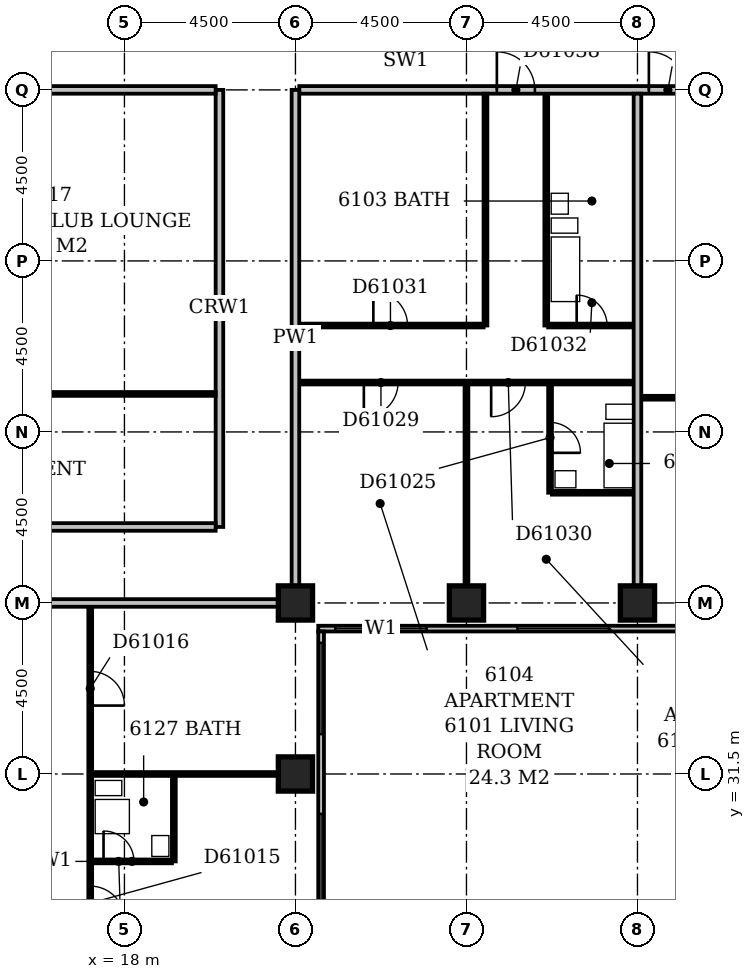
"""IFC4 building model, lengths in metres.
Left out: names, types, materials, properties, quantities, classifications, styles, units other than length and angle.
Written with IfcOpenShell. Run it as: python <this file> out.ifc"""

import sys

from ifc_helpers import new_model, si_unit, direction, frame, frame_2d, origin, origin_2d, place, context, subcontext, project, spatial, rectangle, extrude, element, fill, save


model = new_model("IFC4")
c1 = context("Model", 3, precision=1e-05, world=origin(), true_north=direction((0.0, 1.0)))
c2 = subcontext(c1, "Body", "Model", "MODEL_VIEW")
j1 = project(units=[si_unit("LENGTHUNIT", "METRE"), si_unit("PLANEANGLEUNIT", "RADIAN")], contexts=[c1])
p1 = place(None, origin())
s1 = spatial("IfcSite", under=j1, at=p1, CompositionType="ELEMENT")
p2 = place(p1, origin())
s2 = spatial("IfcBuilding", under=s1, at=p2, CompositionType="ELEMENT")
p3 = place(p2, frame((0.0, 0.0, 236.6)))
s3 = spatial("IfcBuildingStorey", under=s2, at=p3, CompositionType="ELEMENT", Elevation=236.6)
for number, where, z_axis, x_axis in (
    (1, (22.5, 31.5, -0.3), (0.0, 0.0, 1.0), (1.0, 0.0, 0.0)),
    (2, (22.5, 36.0, -0.3), (0.0, 0.0, 1.0), (1.0, 0.0, 0.0)),
    (3, (27.0, 36.0, -0.3), (0.0, 0.0, 1.0), (1.0, 0.0, 0.0)),
    (4, (31.5, 36.0, -0.3), (0.0, 0.0, 1.0), (1.0, 0.0, 0.0)),
):
    element("IfcColumn", number, at=place(p3, frame(where, z_axis=z_axis, x_axis=x_axis)), inside=s3, PredefinedType="COLUMN", context=c2, shape_type="SweptSolid", body=[
        extrude(rectangle(XDim=0.9, YDim=0.9, at=origin_2d()), origin(), (0.0, 0.0, 1.0), 3.6),
    ])
p4 = place(p3, frame((23.175, 17.4, 0.0), z_axis=(0.0, 0.0, 1.0), x_axis=(0.0, 1.0, 0.0)))
e5 = element("IfcWall", 5, at=p4, inside=s3, PredefinedType="STANDARD", context=c2, shape_type="SweptSolid", body=[
    extrude(rectangle(XDim=17.85, YDim=0.15, at=frame_2d((8.925, 0.0))), origin(), (0.0, 0.0, 1.0), 2.7),
])
p5 = place(p4, frame((1.357, 0.0, 0.6)))
e6 = element("IfcOpeningElement", 6, at=p5, cuts=e5, PredefinedType="OPENING", context=c2, shape_type="SweptSolid", body=[
    extrude(rectangle(XDim=2.1, YDim=1.8, at=frame_2d((1.05, 0.9))), frame((0.0, 0.087, 0.0), z_axis=(0.0, -1.0, 0.0), x_axis=(1.0, 0.0, 0.0)), (0.0, 0.0, 1.0), 0.174),
])
p6 = place(p4, frame((6.15, 0.0, 0.6)))
e7 = element("IfcOpeningElement", 7, at=p6, cuts=e5, PredefinedType="OPENING", context=c2, shape_type="SweptSolid", body=[
    extrude(rectangle(XDim=2.4, YDim=1.8, at=frame_2d((1.2, 0.9))), frame((0.0, 0.087, 0.0), z_axis=(0.0, -1.0, 0.0), x_axis=(1.0, 0.0, 0.0)), (0.0, 0.0, 1.0), 0.174),
])
p7 = place(p4, frame((10.65, 0.0, 0.6)))
e8 = element("IfcOpeningElement", 8, at=p7, cuts=e5, PredefinedType="OPENING", context=c2, shape_type="SweptSolid", body=[
    extrude(rectangle(XDim=2.4, YDim=1.8, at=frame_2d((1.2, 0.9))), frame((0.0, 0.087, 0.0), z_axis=(0.0, -1.0, 0.0), x_axis=(1.0, 0.0, 0.0)), (0.0, 0.0, 1.0), 0.174),
])
p8 = place(p4, frame((15.15, 0.0, 0.6)))
e9 = element("IfcOpeningElement", 9, at=p8, cuts=e5, PredefinedType="OPENING", context=c2, shape_type="SweptSolid", body=[
    extrude(rectangle(XDim=2.4, YDim=1.8, at=frame_2d((1.2, 0.9))), frame((0.0, 0.087, 0.0), z_axis=(0.0, -1.0, 0.0), x_axis=(1.0, 0.0, 0.0)), (0.0, 0.0, 1.0), 0.174),
])
p9 = place(p3, frame((23.1, 35.325, 0.0), z_axis=(0.0, 0.0, 1.0), x_axis=(1.0, 0.0, 0.0)))
e10 = element("IfcWall", 10, at=p9, inside=s3, PredefinedType="STANDARD", context=c2, shape_type="SweptSolid", body=[
    extrude(rectangle(XDim=18.15, YDim=0.15, at=frame_2d((9.075, 0.0))), origin(), (0.0, 0.0, 1.0), 2.7),
])
p10 = place(p9, frame((0.45, 0.0, 0.6)))
e11 = element("IfcOpeningElement", 11, at=p10, cuts=e10, PredefinedType="OPENING", context=c2, shape_type="SweptSolid", body=[
    extrude(rectangle(XDim=2.4, YDim=1.8, at=frame_2d((1.2, 0.9))), frame((0.0, 0.087, 0.0), z_axis=(0.0, -1.0, 0.0), x_axis=(1.0, 0.0, 0.0)), (0.0, 0.0, 1.0), 0.174),
])
p11 = place(p9, frame((5.242, 0.0, 0.6)))
e12 = element("IfcOpeningElement", 12, at=p11, cuts=e10, PredefinedType="OPENING", context=c2, shape_type="SweptSolid", body=[
    extrude(rectangle(XDim=2.4, YDim=1.8, at=frame_2d((1.2, 0.9))), frame((0.0, 0.087, 0.0), z_axis=(0.0, -1.0, 0.0), x_axis=(1.0, 0.0, 0.0)), (0.0, 0.0, 1.0), 0.174),
])
p12 = place(p9, frame((9.45, 0.0, 0.6)))
e13 = element("IfcOpeningElement", 13, at=p12, cuts=e10, PredefinedType="OPENING", context=c2, shape_type="SweptSolid", body=[
    extrude(rectangle(XDim=2.4, YDim=1.8, at=frame_2d((1.2, 0.9))), frame((0.0, 0.087, 0.0), z_axis=(0.0, -1.0, 0.0), x_axis=(1.0, 0.0, 0.0)), (0.0, 0.0, 1.0), 0.174),
])
p13 = place(p9, frame((13.95, 0.0, 0.6)))
e14 = element("IfcOpeningElement", 14, at=p13, cuts=e10, PredefinedType="OPENING", context=c2, shape_type="SweptSolid", body=[
    extrude(rectangle(XDim=2.4, YDim=1.8, at=frame_2d((1.2, 0.9))), frame((0.0, 0.087, 0.0), z_axis=(0.0, -1.0, 0.0), x_axis=(1.0, 0.0, 0.0)), (0.0, 0.0, 1.0), 0.174),
])
p14 = place(p3, frame((17.1, 17.4, 0.0), z_axis=(0.0, 0.0, 1.0), x_axis=(0.0, 1.0, 0.0)))
e15 = element("IfcWall", 15, at=p14, inside=s3, PredefinedType="PARTITIONING", context=c2, shape_type="SweptSolid", body=[
    extrude(rectangle(XDim=18.5, YDim=0.1, at=frame_2d((9.25, 0.0))), origin(), (0.0, 0.0, 1.0), 3.3),
])
p15 = place(p14, frame((4.6, 0.0, 0.0)))
e16 = element("IfcOpeningElement", 16, at=p15, cuts=e15, PredefinedType="OPENING", context=c2, shape_type="SweptSolid", body=[
    extrude(rectangle(XDim=0.9, YDim=2.1, at=frame_2d((0.45, 1.05))), frame((0.0, 0.062, 0.0), z_axis=(0.0, -1.0, 0.0), x_axis=(1.0, 0.0, 0.0)), (0.0, 0.0, 1.0), 0.124),
])
p16 = place(p14, frame((10.25, 0.0, 0.0)))
e17 = element("IfcOpeningElement", 17, at=p16, cuts=e15, PredefinedType="OPENING", context=c2, shape_type="SweptSolid", body=[
    extrude(rectangle(XDim=0.9, YDim=2.1, at=frame_2d((0.45, 1.05))), frame((0.0, 0.062, 0.0), z_axis=(0.0, -1.0, 0.0), x_axis=(1.0, 0.0, 0.0)), (0.0, 0.0, 1.0), 0.124),
])
p17 = place(p14, frame((15.9, 0.0, 0.0)))
e18 = element("IfcOpeningElement", 18, at=p17, cuts=e15, PredefinedType="OPENING", context=c2, shape_type="SweptSolid", body=[
    extrude(rectangle(XDim=0.9, YDim=2.1, at=frame_2d((0.45, 1.05))), frame((0.0, 0.062, 0.0), z_axis=(0.0, -1.0, 0.0), x_axis=(1.0, 0.0, 0.0)), (0.0, 0.0, 1.0), 0.124),
])
p18 = place(p3, frame((17.15, 29.2, 0.0), z_axis=(0.0, 0.0, 1.0), x_axis=(1.0, 0.0, 0.0)))
e19 = element("IfcWall", 19, at=p18, inside=s3, PredefinedType="PLUMBINGWALL", context=c2, shape_type="SweptSolid", body=[
    extrude(rectangle(XDim=2.1, YDim=0.1, at=frame_2d((1.05, 0.0))), origin(), (0.0, 0.0, 1.0), 3.3),
])
p19 = place(p18, frame((0.3, 0.0, 0.0)))
e20 = element("IfcOpeningElement", 20, at=p19, cuts=e19, PredefinedType="OPENING", context=c2, shape_type="SweptSolid", body=[
    extrude(rectangle(XDim=0.8, YDim=2.1, at=frame_2d((0.4, 1.05))), frame((0.0, 0.062, 0.0), z_axis=(0.0, -1.0, 0.0), x_axis=(1.0, 0.0, 0.0)), (0.0, 0.0, 1.0), 0.124),
])
p20 = place(p3, frame((19.3, 29.2, 0.0), z_axis=(0.0, 0.0, 1.0), x_axis=(0.0, 1.0, 0.0)))
e21 = element("IfcWall", 21, at=p20, inside=s3, PredefinedType="PLUMBINGWALL", context=c2, shape_type="SweptSolid", body=[
    extrude(rectangle(XDim=2.25, YDim=0.1, at=frame_2d((1.125, 0.0))), origin(), (0.0, 0.0, 1.0), 3.3),
])
p21 = place(p3, frame((17.15, 31.5, 0.0), z_axis=(0.0, 0.0, 1.0), x_axis=(1.0, 0.0, 0.0)))
e22 = element("IfcWall", 22, at=p21, inside=s3, PredefinedType="PARTITIONING", context=c2, shape_type="SweptSolid", body=[
    extrude(rectangle(XDim=4.9, YDim=0.1, at=frame_2d((2.45, 0.0))), origin(), (0.0, 0.0, 1.0), 3.3),
])
p22 = place(p3, frame((9.1, 36.0, 0.0), z_axis=(0.0, 0.0, 1.0), x_axis=(1.0, 0.0, 0.0)))
e23 = element("IfcWall", 23, at=p22, inside=s3, PredefinedType="PARTITIONING", context=c2, shape_type="SweptSolid", body=[
    extrude(rectangle(XDim=12.95, YDim=0.2, at=frame_2d((6.475, 0.0))), origin(), (0.0, 0.0, 1.0), 3.3),
])
p23 = place(p3, frame((22.5, 36.45, 0.0), z_axis=(0.0, 0.0, 1.0), x_axis=(0.0, 1.0, 0.0)))
e24 = element("IfcWall", 24, at=p23, inside=s3, PredefinedType="PARTITIONING", context=c2, shape_type="SweptSolid", body=[
    extrude(rectangle(XDim=13.05, YDim=0.2, at=frame_2d((6.525, 0.0))), origin(), (0.0, 0.0, 1.0), 3.3),
])
p24 = place(p3, frame((27.0, 36.45, 0.0), z_axis=(0.0, 0.0, 1.0), x_axis=(0.0, 1.0, 0.0)))
e25 = element("IfcWall", 25, at=p24, inside=s3, PredefinedType="PARTITIONING", context=c2, shape_type="SweptSolid", body=[
    extrude(rectangle(XDim=5.3, YDim=0.1, at=frame_2d((2.65, 0.0))), origin(), (0.0, 0.0, 1.0), 3.3),
])
p25 = place(p3, frame((31.5, 36.45, 0.0), z_axis=(0.0, 0.0, 1.0), x_axis=(0.0, 1.0, 0.0)))
e26 = element("IfcWall", 26, at=p25, inside=s3, PredefinedType="PARTITIONING", context=c2, shape_type="SweptSolid", body=[
    extrude(rectangle(XDim=12.95, YDim=0.2, at=frame_2d((6.475, 0.0))), origin(), (0.0, 0.0, 1.0), 3.3),
])
p26 = place(p3, frame((9.1, 38.0, 0.0), z_axis=(0.0, 0.0, 1.0), x_axis=(1.0, 0.0, 0.0)))
e27 = element("IfcWall", 27, at=p26, inside=s3, PredefinedType="PARTITIONING", context=c2, shape_type="SweptSolid", body=[
    extrude(rectangle(XDim=11.3, YDim=0.2, at=frame_2d((5.65, 0.0))), origin(), (0.0, 0.0, 1.0), 3.3),
])
p27 = place(p3, frame((20.5, 38.0, 0.0), z_axis=(0.0, 0.0, 1.0), x_axis=(0.0, 1.0, 0.0)))
e28 = element("IfcWall", 28, at=p27, inside=s3, PredefinedType="PARTITIONING", context=c2, shape_type="SweptSolid", body=[
    extrude(rectangle(XDim=11.5, YDim=0.2, at=frame_2d((5.75, 0.0))), origin(), (0.0, 0.0, 1.0), 3.3),
])
p28 = place(p3, frame((29.2, 38.9, 0.0), z_axis=(0.0, 0.0, 1.0), x_axis=(0.0, 1.0, 0.0)))
e29 = element("IfcWall", 29, at=p28, inside=s3, PredefinedType="PLUMBINGWALL", context=c2, shape_type="SweptSolid", body=[
    extrude(rectangle(XDim=2.85, YDim=0.1, at=frame_2d((1.425, 0.0))), origin(), (0.0, 0.0, 1.0), 3.3),
])
p29 = place(p28, frame((1.05, 0.0, 0.0)))
e30 = element("IfcOpeningElement", 30, at=p29, cuts=e29, PredefinedType="OPENING", context=c2, shape_type="SweptSolid", body=[
    extrude(rectangle(XDim=0.8, YDim=2.1, at=frame_2d((0.4, 1.05))), frame((0.0, 0.062, 0.0), z_axis=(0.0, -1.0, 0.0), x_axis=(1.0, 0.0, 0.0)), (0.0, 0.0, 1.0), 0.124),
])
p30 = place(p3, frame((29.25, 38.9, 0.0), z_axis=(0.0, 0.0, 1.0), x_axis=(1.0, 0.0, 0.0)))
e31 = element("IfcWall", 31, at=p30, inside=s3, PredefinedType="PLUMBINGWALL", context=c2, shape_type="SweptSolid", body=[
    extrude(rectangle(XDim=2.15, YDim=0.1, at=frame_2d((1.075, 0.0))), origin(), (0.0, 0.0, 1.0), 3.3),
])
p31 = place(p3, frame((31.6, 41.4, 0.0), z_axis=(0.0, 0.0, 1.0), x_axis=(1.0, 0.0, 0.0)))
e32 = element("IfcWall", 32, at=p31, inside=s3, PredefinedType="PARTITIONING", context=c2, shape_type="SweptSolid", body=[
    extrude(rectangle(XDim=14.0, YDim=0.1, at=frame_2d((7.0, 0.0))), origin(), (0.0, 0.0, 1.0), 3.3),
])
p32 = place(p31, frame((1.7, 0.0, 0.0)))
e33 = element("IfcOpeningElement", 33, at=p32, cuts=e32, PredefinedType="OPENING", context=c2, shape_type="SweptSolid", body=[
    extrude(rectangle(XDim=0.9, YDim=2.1, at=frame_2d((0.45, 1.05))), frame((0.0, 0.062, 0.0), z_axis=(0.0, -1.0, 0.0), x_axis=(1.0, 0.0, 0.0)), (0.0, 0.0, 1.0), 0.124),
])
p33 = place(p31, frame((6.2, 0.0, 0.0)))
e34 = element("IfcOpeningElement", 34, at=p33, cuts=e32, PredefinedType="OPENING", context=c2, shape_type="SweptSolid", body=[
    extrude(rectangle(XDim=0.9, YDim=2.1, at=frame_2d((0.45, 1.05))), frame((0.0, 0.062, 0.0), z_axis=(0.0, -1.0, 0.0), x_axis=(1.0, 0.0, 0.0)), (0.0, 0.0, 1.0), 0.124),
])
p34 = place(p31, frame((10.7, 0.0, 0.0)))
e35 = element("IfcOpeningElement", 35, at=p34, cuts=e32, PredefinedType="OPENING", context=c2, shape_type="SweptSolid", body=[
    extrude(rectangle(XDim=0.9, YDim=2.1, at=frame_2d((0.45, 1.05))), frame((0.0, 0.062, 0.0), z_axis=(0.0, -1.0, 0.0), x_axis=(1.0, 0.0, 0.0)), (0.0, 0.0, 1.0), 0.124),
])
p35 = place(p3, frame((9.1, 41.5, 0.0), z_axis=(0.0, 0.0, 1.0), x_axis=(1.0, 0.0, 0.0)))
e36 = element("IfcWall", 36, at=p35, inside=s3, PredefinedType="PARTITIONING", context=c2, shape_type="SweptSolid", body=[
    extrude(rectangle(XDim=11.3, YDim=0.1, at=frame_2d((5.65, 0.0))), origin(), (0.0, 0.0, 1.0), 3.3),
])
p36 = place(p3, frame((22.6, 41.8, 0.0), z_axis=(0.0, 0.0, 1.0), x_axis=(1.0, 0.0, 0.0)))
e37 = element("IfcWall", 37, at=p36, inside=s3, PredefinedType="PARTITIONING", context=c2, shape_type="SweptSolid", body=[
    extrude(rectangle(XDim=8.8, YDim=0.1, at=frame_2d((4.4, 0.0))), origin(), (0.0, 0.0, 1.0), 3.3),
])
p37 = place(p36, frame((1.7, 0.0, 0.0)))
e38 = element("IfcOpeningElement", 38, at=p37, cuts=e37, PredefinedType="OPENING", context=c2, shape_type="SweptSolid", body=[
    extrude(rectangle(XDim=0.9, YDim=2.1, at=frame_2d((0.45, 1.05))), frame((0.0, 0.062, 0.0), z_axis=(0.0, -1.0, 0.0), x_axis=(1.0, 0.0, 0.0)), (0.0, 0.0, 1.0), 0.124),
])
p38 = place(p36, frame((5.05, 0.0, 0.0)))
e39 = element("IfcOpeningElement", 39, at=p38, cuts=e37, PredefinedType="OPENING", context=c2, shape_type="SweptSolid", body=[
    extrude(rectangle(XDim=0.9, YDim=2.1, at=frame_2d((0.45, 1.05))), frame((0.0, 0.062, 0.0), z_axis=(0.0, -1.0, 0.0), x_axis=(1.0, 0.0, 0.0)), (0.0, 0.0, 1.0), 0.124),
])
p39 = place(p3, frame((22.6, 43.3, 0.0), z_axis=(0.0, 0.0, 1.0), x_axis=(1.0, 0.0, 0.0)))
e40 = element("IfcWall", 40, at=p39, inside=s3, PredefinedType="PARTITIONING", context=c2, shape_type="SweptSolid", body=[
    extrude(rectangle(XDim=4.85, YDim=0.1, at=frame_2d((2.425, 0.0))), origin(), (0.0, 0.0, 1.0), 3.3),
])
p40 = place(p39, frame((1.95, 0.0, 0.0)))
e41 = element("IfcOpeningElement", 41, at=p40, cuts=e40, PredefinedType="OPENING", context=c2, shape_type="SweptSolid", body=[
    extrude(rectangle(XDim=0.9, YDim=2.1, at=frame_2d((0.45, 1.05))), frame((0.0, 0.062, 0.0), z_axis=(0.0, -1.0, 0.0), x_axis=(1.0, 0.0, 0.0)), (0.0, 0.0, 1.0), 0.124),
])
p41 = place(p3, frame((27.5, 43.3, 0.0), z_axis=(0.0, 0.0, 1.0), x_axis=(0.0, 1.0, 0.0)))
e42 = element("IfcWall", 42, at=p41, inside=s3, PredefinedType="PARTITIONING", context=c2, shape_type="SweptSolid", body=[
    extrude(rectangle(XDim=6.1, YDim=0.1, at=frame_2d((3.05, 0.0))), origin(), (0.0, 0.0, 1.0), 3.3),
])
p42 = place(p3, frame((29.1, 43.3, 0.0), z_axis=(0.0, 0.0, 1.0), x_axis=(0.0, 1.0, 0.0)))
e43 = element("IfcWall", 43, at=p42, inside=s3, PredefinedType="PLUMBINGWALL", context=c2, shape_type="SweptSolid", body=[
    extrude(rectangle(XDim=6.1, YDim=0.1, at=frame_2d((3.05, 0.0))), origin(), (0.0, 0.0, 1.0), 3.3),
])
p43 = place(p3, frame((29.15, 43.3, 0.0), z_axis=(0.0, 0.0, 1.0), x_axis=(1.0, 0.0, 0.0)))
e44 = element("IfcWall", 44, at=p43, inside=s3, PredefinedType="PARTITIONING", context=c2, shape_type="SweptSolid", body=[
    extrude(rectangle(XDim=2.25, YDim=0.1, at=frame_2d((1.125, 0.0))), origin(), (0.0, 0.0, 1.0), 3.3),
])
p44 = place(p43, frame((0.75, 0.0, 0.0)))
e45 = element("IfcOpeningElement", 45, at=p44, cuts=e44, PredefinedType="OPENING", context=c2, shape_type="SweptSolid", body=[
    extrude(rectangle(XDim=0.8, YDim=2.1, at=frame_2d((0.4, 1.05))), frame((0.0, 0.062, 0.0), z_axis=(0.0, -1.0, 0.0), x_axis=(1.0, 0.0, 0.0)), (0.0, 0.0, 1.0), 0.124),
])
p45 = place(p3, frame((9.1, 49.5, 0.0), z_axis=(0.0, 0.0, 1.0), x_axis=(1.0, 0.0, 0.0)))
e46 = element("IfcWall", 46, at=p45, inside=s3, PredefinedType="PARTITIONING", context=c2, shape_type="SweptSolid", body=[
    extrude(rectangle(XDim=11.3, YDim=0.2, at=frame_2d((5.65, 0.0))), origin(), (0.0, 0.0, 1.0), 3.3),
])
p46 = place(p45, frame((5.15, 0.0, 0.0)))
e47 = element("IfcOpeningElement", 47, at=p46, cuts=e46, PredefinedType="OPENING", context=c2, shape_type="SweptSolid", body=[
    extrude(rectangle(XDim=0.9, YDim=2.1, at=frame_2d((0.45, 1.05))), frame((0.0, 0.112, 0.0), z_axis=(0.0, -1.0, 0.0), x_axis=(1.0, 0.0, 0.0)), (0.0, 0.0, 1.0), 0.224),
])
p47 = place(p3, frame((22.6, 49.5, 0.0), z_axis=(0.0, 0.0, 1.0), x_axis=(1.0, 0.0, 0.0)))
e48 = element("IfcWall", 48, at=p47, inside=s3, PredefinedType="PARTITIONING", context=c2, shape_type="SweptSolid", body=[
    extrude(rectangle(XDim=21.95, YDim=0.2, at=frame_2d((10.975, 0.0))), origin(), (0.0, 0.0, 1.0), 3.3),
])
p48 = place(p47, frame((5.2, 0.0, 0.0)))
e49 = element("IfcOpeningElement", 49, at=p48, cuts=e48, PredefinedType="OPENING", context=c2, shape_type="SweptSolid", body=[
    extrude(rectangle(XDim=1.0, YDim=2.1, at=frame_2d((0.5, 1.05))), frame((0.0, 0.112, 0.0), z_axis=(0.0, -1.0, 0.0), x_axis=(1.0, 0.0, 0.0)), (0.0, 0.0, 1.0), 0.224),
])
p49 = place(p47, frame((9.2, 0.0, 0.0)))
e50 = element("IfcOpeningElement", 50, at=p49, cuts=e48, PredefinedType="OPENING", context=c2, shape_type="SweptSolid", body=[
    extrude(rectangle(XDim=1.0, YDim=2.1, at=frame_2d((0.5, 1.05))), frame((0.0, 0.112, 0.0), z_axis=(0.0, -1.0, 0.0), x_axis=(1.0, 0.0, 0.0)), (0.0, 0.0, 1.0), 0.224),
])
p50 = place(p7, origin())
e51 = element("IfcWindow", 51, at=p50, inside=s3, PartitioningType="SINGLE_PANEL", PredefinedType="WINDOW", context=c2, shape_type="SweptSolid", body=[
    extrude(rectangle(XDim=2.4, YDim=1.8, at=frame_2d((1.2, 0.9))), frame((0.0, 0.03, 0.0), z_axis=(0.0, -1.0, 0.0), x_axis=(1.0, 0.0, 0.0)), (0.0, 0.0, 1.0), 0.06),
])
fill(e8, e51)
p51 = place(p8, origin())
e52 = element("IfcWindow", 52, at=p51, inside=s3, PartitioningType="SINGLE_PANEL", PredefinedType="WINDOW", context=c2, shape_type="SweptSolid", body=[
    extrude(rectangle(XDim=2.4, YDim=1.8, at=frame_2d((1.2, 0.9))), frame((0.0, 0.03, 0.0), z_axis=(0.0, -1.0, 0.0), x_axis=(1.0, 0.0, 0.0)), (0.0, 0.0, 1.0), 0.06),
])
fill(e9, e52)
p52 = place(p10, origin())
e53 = element("IfcWindow", 53, at=p52, inside=s3, PartitioningType="SINGLE_PANEL", PredefinedType="WINDOW", context=c2, shape_type="SweptSolid", body=[
    extrude(rectangle(XDim=2.4, YDim=1.8, at=frame_2d((1.2, 0.9))), frame((0.0, 0.03, 0.0), z_axis=(0.0, -1.0, 0.0), x_axis=(1.0, 0.0, 0.0)), (0.0, 0.0, 1.0), 0.06),
])
fill(e11, e53)
p53 = place(p11, origin())
e54 = element("IfcWindow", 54, at=p53, inside=s3, PartitioningType="SINGLE_PANEL", PredefinedType="WINDOW", context=c2, shape_type="SweptSolid", body=[
    extrude(rectangle(XDim=2.4, YDim=1.8, at=frame_2d((1.2, 0.9))), frame((0.0, 0.03, 0.0), z_axis=(0.0, -1.0, 0.0), x_axis=(1.0, 0.0, 0.0)), (0.0, 0.0, 1.0), 0.06),
])
fill(e12, e54)
p54 = place(p16, frame((0.9, 0.0, 0.0), z_axis=(0.0, 0.0, 1.0), x_axis=(-1.0, 0.0, 0.0)))
e55 = element("IfcDoor", 55, at=p54, inside=s3, OperationType="SINGLE_SWING_RIGHT", PredefinedType="DOOR", context=c2, shape_type="SweptSolid", body=[
    extrude(rectangle(XDim=0.9, YDim=2.1, at=frame_2d((0.45, 1.05))), frame((0.0, 0.025, 0.0), z_axis=(0.0, -1.0, 0.0), x_axis=(1.0, 0.0, 0.0)), (0.0, 0.0, 1.0), 0.05),
])
fill(e17, e55)
p55 = place(p17, frame((0.9, 0.0, 0.0), z_axis=(0.0, 0.0, 1.0), x_axis=(-1.0, 0.0, 0.0)))
e56 = element("IfcDoor", 56, at=p55, inside=s3, OperationType="SINGLE_SWING_RIGHT", PredefinedType="DOOR", context=c2, shape_type="SweptSolid", body=[
    extrude(rectangle(XDim=0.9, YDim=2.1, at=frame_2d((0.45, 1.05))), frame((0.0, 0.025, 0.0), z_axis=(0.0, -1.0, 0.0), x_axis=(1.0, 0.0, 0.0)), (0.0, 0.0, 1.0), 0.05),
])
fill(e18, e56)
p56 = place(p19, origin())
e57 = element("IfcDoor", 57, at=p56, inside=s3, OperationType="SINGLE_SWING_LEFT", PredefinedType="DOOR", context=c2, shape_type="SweptSolid", body=[
    extrude(rectangle(XDim=0.8, YDim=2.1, at=frame_2d((0.4, 1.05))), frame((0.0, 0.025, 0.0), z_axis=(0.0, -1.0, 0.0), x_axis=(1.0, 0.0, 0.0)), (0.0, 0.0, 1.0), 0.05),
])
fill(e20, e57)
p57 = place(p29, frame((0.8, 0.0, 0.0), z_axis=(0.0, 0.0, 1.0), x_axis=(-1.0, 0.0, 0.0)))
e58 = element("IfcDoor", 58, at=p57, inside=s3, OperationType="SINGLE_SWING_RIGHT", PredefinedType="DOOR", context=c2, shape_type="SweptSolid", body=[
    extrude(rectangle(XDim=0.8, YDim=2.1, at=frame_2d((0.4, 1.05))), frame((0.0, 0.025, 0.0), z_axis=(0.0, -1.0, 0.0), x_axis=(1.0, 0.0, 0.0)), (0.0, 0.0, 1.0), 0.05),
])
fill(e30, e58)
p58 = place(p37, frame((0.9, 0.0, 0.0), z_axis=(0.0, 0.0, 1.0), x_axis=(-1.0, 0.0, 0.0)))
e59 = element("IfcDoor", 59, at=p58, inside=s3, OperationType="SINGLE_SWING_RIGHT", PredefinedType="DOOR", context=c2, shape_type="SweptSolid", body=[
    extrude(rectangle(XDim=0.9, YDim=2.1, at=frame_2d((0.45, 1.05))), frame((0.0, 0.025, 0.0), z_axis=(0.0, -1.0, 0.0), x_axis=(1.0, 0.0, 0.0)), (0.0, 0.0, 1.0), 0.05),
])
fill(e38, e59)
p59 = place(p38, frame((0.9, 0.0, 0.0), z_axis=(0.0, 0.0, 1.0), x_axis=(-1.0, 0.0, 0.0)))
e60 = element("IfcDoor", 60, at=p59, inside=s3, OperationType="SINGLE_SWING_RIGHT", PredefinedType="DOOR", context=c2, shape_type="SweptSolid", body=[
    extrude(rectangle(XDim=0.9, YDim=2.1, at=frame_2d((0.45, 1.05))), frame((0.0, 0.025, 0.0), z_axis=(0.0, -1.0, 0.0), x_axis=(1.0, 0.0, 0.0)), (0.0, 0.0, 1.0), 0.05),
])
fill(e39, e60)
p60 = place(p40, origin())
e61 = element("IfcDoor", 61, at=p60, inside=s3, OperationType="SINGLE_SWING_LEFT", PredefinedType="DOOR", context=c2, shape_type="SweptSolid", body=[
    extrude(rectangle(XDim=0.9, YDim=2.1, at=frame_2d((0.45, 1.05))), frame((0.0, 0.025, 0.0), z_axis=(0.0, -1.0, 0.0), x_axis=(1.0, 0.0, 0.0)), (0.0, 0.0, 1.0), 0.05),
])
fill(e41, e61)
p61 = place(p44, origin())
e62 = element("IfcDoor", 62, at=p61, inside=s3, OperationType="SINGLE_SWING_LEFT", PredefinedType="DOOR", context=c2, shape_type="SweptSolid", body=[
    extrude(rectangle(XDim=0.8, YDim=2.1, at=frame_2d((0.4, 1.05))), frame((0.0, 0.025, 0.0), z_axis=(0.0, -1.0, 0.0), x_axis=(1.0, 0.0, 0.0)), (0.0, 0.0, 1.0), 0.05),
])
fill(e45, e62)
p62 = place(p48, origin())
e63 = element("IfcDoor", 63, at=p62, inside=s3, OperationType="SINGLE_SWING_LEFT", PredefinedType="DOOR", context=c2, shape_type="SweptSolid", body=[
    extrude(rectangle(XDim=1.0, YDim=2.1, at=frame_2d((0.5, 1.05))), frame((0.0, 0.025, 0.0), z_axis=(0.0, -1.0, 0.0), x_axis=(1.0, 0.0, 0.0)), (0.0, 0.0, 1.0), 0.05),
])
fill(e49, e63)
p63 = place(p49, origin())
e64 = element("IfcDoor", 64, at=p63, inside=s3, OperationType="SINGLE_SWING_LEFT", PredefinedType="DOOR", context=c2, shape_type="SweptSolid", body=[
    extrude(rectangle(XDim=1.0, YDim=2.1, at=frame_2d((0.5, 1.05))), frame((0.0, 0.025, 0.0), z_axis=(0.0, -1.0, 0.0), x_axis=(1.0, 0.0, 0.0)), (0.0, 0.0, 1.0), 0.05),
])
fill(e50, e64)
save(model, sys.argv[1])
